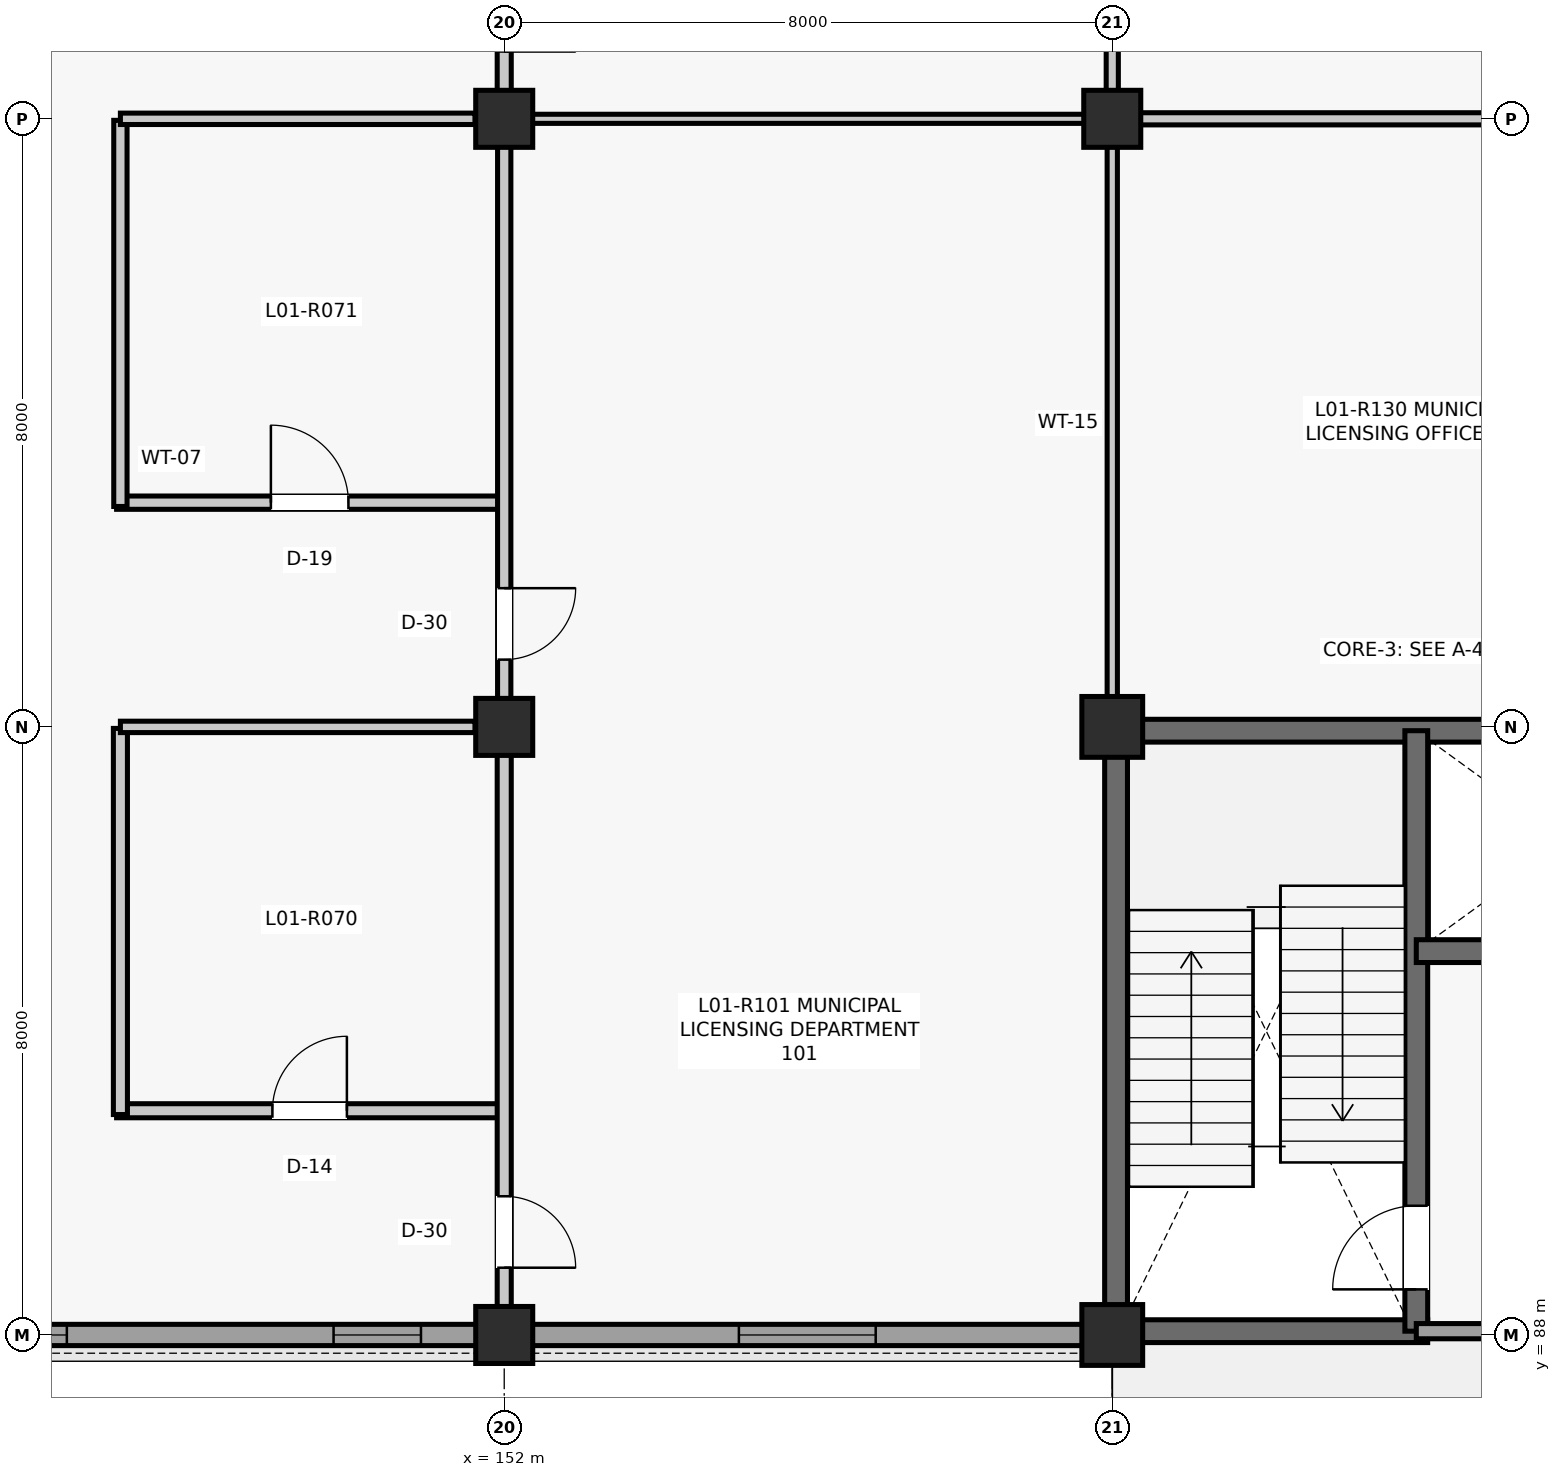
"""IFC4 building model, lengths in metres.
Left out: names, types, materials, properties, quantities, classifications, styles, units other than length and angle.
Written with IfcOpenShell. Run it as: python <this file> out.ifc"""

import sys

from ifc_helpers import new_model, si_unit, direction, frame, frame_2d, origin, origin_2d, place, context, subcontext, project, spatial, rectangle, extrude, element, fill, save


model = new_model("IFC4")
c1 = context("Model", 3, precision=1e-05, world=origin(), true_north=direction((0.0, 1.0)))
c2 = subcontext(c1, "Body", "Model", "MODEL_VIEW")
j1 = project(units=[si_unit("LENGTHUNIT", "METRE"), si_unit("PLANEANGLEUNIT", "RADIAN")], contexts=[c1])
p1 = place(None, origin())
s1 = spatial("IfcSite", under=j1, at=p1, CompositionType="ELEMENT")
p2 = place(p1, origin())
s2 = spatial("IfcBuilding", under=s1, at=p2, CompositionType="ELEMENT")
p3 = place(p2, frame((0.0, 0.0, 5.28)))
s3 = spatial("IfcBuildingStorey", under=s2, at=p3, CompositionType="ELEMENT", Elevation=5.28)
for number, where, z_axis, x_axis in (
    (1, (152.0, 88.0, 0.0), (0.0, 0.0, 1.0), (1.0, 0.0, 0.0)),
    (2, (152.0, 96.0, 0.0), (0.0, 0.0, 1.0), (1.0, 0.0, 0.0)),
    (3, (152.0, 104.0, 0.0), (0.0, 0.0, 1.0), (1.0, 0.0, 0.0)),
):
    element("IfcColumn", number, at=place(p3, frame(where, z_axis=z_axis, x_axis=x_axis)), inside=s3, PredefinedType="COLUMN", context=c2, shape_type="SweptSolid", body=[
        extrude(rectangle(XDim=0.75, YDim=0.75, at=origin_2d()), origin(), (0.0, 0.0, 1.0), 4.62),
    ])
for number, where, z_axis, x_axis in (
    (4, (160.0, 88.0, 0.0), (0.0, 0.0, 1.0), (1.0, 0.0, 0.0)),
    (5, (160.0, 96.0, 0.0), (0.0, 0.0, 1.0), (1.0, 0.0, 0.0)),
):
    element("IfcColumn", number, at=place(p3, frame(where, z_axis=z_axis, x_axis=x_axis)), inside=s3, PredefinedType="COLUMN", context=c2, shape_type="SweptSolid", body=[
        extrude(rectangle(XDim=0.8, YDim=0.8, at=origin_2d()), origin(), (0.0, 0.0, 1.0), 4.62),
    ])
p4 = place(p3, frame((160.0, 104.0, 0.0), z_axis=(0.0, 0.0, 1.0), x_axis=(1.0, 0.0, 0.0)))
e6 = element("IfcColumn", 6, at=p4, inside=s3, PredefinedType="COLUMN", context=c2, shape_type="SweptSolid", body=[
    extrude(rectangle(XDim=0.75, YDim=0.75, at=origin_2d()), origin(), (0.0, 0.0, 1.0), 4.62),
])
p5 = place(p3, frame((144.36, 88.0, 0.0), z_axis=(0.0, 0.0, 1.0), x_axis=(1.0, 0.0, 0.0)))
e7 = element("IfcWall", 7, at=p5, inside=s3, PredefinedType="SOLIDWALL", context=c2, shape_type="SweptSolid", body=[
    extrude(rectangle(XDim=7.28, YDim=0.28, at=frame_2d((3.64, 0.0))), origin(), (0.0, 0.0, 1.0), 3.914),
])
p6 = place(p5, frame((0.735, 0.0, 0.95)))
e8 = element("IfcOpeningElement", 8, at=p6, cuts=e7, PredefinedType="OPENING", context=c2, shape_type="SweptSolid", body=[
    extrude(rectangle(XDim=1.15, YDim=1.65, at=frame_2d((0.575, 0.825))), frame((0.0, 0.15, 0.0), z_axis=(0.0, -1.0, 0.0), x_axis=(1.0, 0.0, 0.0)), (0.0, 0.0, 1.0), 0.3),
])
p7 = place(p5, frame((5.395, 0.0, 0.95)))
e9 = element("IfcOpeningElement", 9, at=p7, cuts=e7, PredefinedType="OPENING", context=c2, shape_type="SweptSolid", body=[
    extrude(rectangle(XDim=1.15, YDim=1.65, at=frame_2d((0.575, 0.825))), frame((0.0, 0.15, 0.0), z_axis=(0.0, -1.0, 0.0), x_axis=(1.0, 0.0, 0.0)), (0.0, 0.0, 1.0), 0.3),
])
p8 = place(p3, frame((152.36, 88.0, 0.0), z_axis=(0.0, 0.0, 1.0), x_axis=(1.0, 0.0, 0.0)))
e10 = element("IfcWall", 10, at=p8, inside=s3, PredefinedType="SOLIDWALL", context=c2, shape_type="SweptSolid", body=[
    extrude(rectangle(XDim=7.255, YDim=0.28, at=frame_2d((3.627, 0.0))), origin(), (0.0, 0.0, 1.0), 3.977),
])
p9 = place(p8, frame((2.728, 0.0, 0.9)))
e11 = element("IfcOpeningElement", 11, at=p9, cuts=e10, PredefinedType="OPENING", context=c2, shape_type="SweptSolid", body=[
    extrude(rectangle(XDim=1.8, YDim=2.3, at=frame_2d((0.9, 1.15))), frame((0.0, 0.15, 0.0), z_axis=(0.0, -1.0, 0.0), x_axis=(1.0, 0.0, 0.0)), (0.0, 0.0, 1.0), 0.3),
])
for number, where, z_axis, x_axis in (
    (12, (160.05, 88.29, 0.0), (0.0, 0.0, 1.0), (0.0, 1.0, 0.0)),
    (13, (160.29, 95.95, 0.0), (0.0, 0.0, 1.0), (1.0, 0.0, 0.0)),
):
    element("IfcWall", number, at=place(p3, frame(where, z_axis=z_axis, x_axis=x_axis)), inside=s3, PredefinedType="SHEAR", context=c2, shape_type="SweptSolid", body=[
        extrude(rectangle(XDim=7.42, YDim=0.3, at=frame_2d((3.71, 0.0))), origin(), (0.0, 0.0, 1.0), 4.335),
    ])
p10 = place(p3, frame((160.29, 88.05, 0.0), z_axis=(0.0, 0.0, 1.0), x_axis=(1.0, 0.0, 0.0)))
e14 = element("IfcWall", 14, at=p10, inside=s3, PredefinedType="SHEAR", context=c2, shape_type="SweptSolid", body=[
    extrude(rectangle(XDim=3.86, YDim=0.3, at=frame_2d((1.93, 0.0))), origin(), (0.0, 0.0, 1.0), 4.335),
])
p11 = place(p3, frame((164.0, 88.05, 0.0), z_axis=(0.0, 0.0, 1.0), x_axis=(0.0, 1.0, 0.0)))
e15 = element("IfcWall", 15, at=p11, inside=s3, PredefinedType="SHEAR", context=c2, shape_type="SweptSolid", body=[
    extrude(rectangle(XDim=7.9, YDim=0.3, at=frame_2d((3.95, 0.0))), origin(), (0.0, 0.0, 1.0), 4.335),
])
p12 = place(p11, frame((0.55, 0.0, 0.0)))
e16 = element("IfcOpeningElement", 16, at=p12, cuts=e15, PredefinedType="OPENING", context=c2, shape_type="SweptSolid", body=[
    extrude(rectangle(XDim=1.1, YDim=2.15, at=frame_2d((0.55, 1.075))), frame((0.0, 0.16, 0.0), z_axis=(0.0, -1.0, 0.0), x_axis=(1.0, 0.0, 0.0)), (0.0, 0.0, 1.0), 0.32),
])
p13 = place(p3, frame((164.0, 93.05, 0.0), z_axis=(0.0, 0.0, 1.0), x_axis=(1.0, 0.0, 0.0)))
e17 = element("IfcWall", 17, at=p13, inside=s3, PredefinedType="SHEAR", context=c2, shape_type="SweptSolid", body=[
    extrude(rectangle(XDim=3.95, YDim=0.3, at=frame_2d((1.975, 0.0))), origin(), (0.0, 0.0, 1.0), 4.335),
])
p14 = place(p13, frame((1.375, 0.0, 0.0)))
e18 = element("IfcOpeningElement", 18, at=p14, cuts=e17, PredefinedType="OPENING", context=c2, shape_type="SweptSolid", body=[
    extrude(rectangle(XDim=1.2, YDim=2.2, at=frame_2d((0.6, 1.1))), frame((0.0, 0.16, 0.0), z_axis=(0.0, -1.0, 0.0), x_axis=(1.0, 0.0, 0.0)), (0.0, 0.0, 1.0), 0.32),
])
p15 = place(p3, frame((164.0, 88.05, 0.0), z_axis=(0.0, 0.0, 1.0), x_axis=(1.0, 0.0, 0.0)))
e19 = element("IfcWall", 19, at=p15, inside=s3, PredefinedType="PARTITIONING", context=c2, shape_type="SweptSolid", body=[
    extrude(rectangle(XDim=3.61, YDim=0.2, at=frame_2d((1.805, 0.0))), origin(), (0.0, 0.0, 1.0), 3.903),
])
p16 = place(p3, frame((146.9, 90.95, 0.0), z_axis=(0.0, 0.0, 1.0), x_axis=(1.0, 0.0, 0.0)))
e20 = element("IfcWall", 20, at=p16, inside=s3, PredefinedType="PARTITIONING", context=c2, shape_type="SweptSolid", body=[
    extrude(rectangle(XDim=5.08, YDim=0.185, at=frame_2d((2.54, 0.0))), origin(), (0.0, 0.0, 1.0), 3.781),
])
p17 = place(p16, frame((2.05, 0.0, 0.0)))
e21 = element("IfcOpeningElement", 21, at=p17, cuts=e20, PredefinedType="OPENING", context=c2, shape_type="SweptSolid", body=[
    extrude(rectangle(XDim=0.98, YDim=2.15, at=frame_2d((0.49, 1.075))), frame((0.0, 0.103, 0.0), z_axis=(0.0, -1.0, 0.0), x_axis=(1.0, 0.0, 0.0)), (0.0, 0.0, 1.0), 0.205),
])
p18 = place(p3, frame((146.95, 90.9, 0.0), z_axis=(0.0, 0.0, 1.0), x_axis=(0.0, 1.0, 0.0)))
e22 = element("IfcWall", 22, at=p18, inside=s3, PredefinedType="PARTITIONING", context=c2, shape_type="SweptSolid", body=[
    extrude(rectangle(XDim=5.08, YDim=0.185, at=frame_2d((2.54, 0.0))), origin(), (0.0, 0.0, 1.0), 3.771),
])
p19 = place(p3, frame((146.95, 96.0, 0.0), z_axis=(0.0, 0.0, 1.0), x_axis=(1.0, 0.0, 0.0)))
e23 = element("IfcWall", 23, at=p19, inside=s3, PredefinedType="PARTITIONING", context=c2, shape_type="SweptSolid", body=[
    extrude(rectangle(XDim=4.665, YDim=0.15, at=frame_2d((2.333, 0.0))), origin(), (0.0, 0.0, 1.0), 3.771),
])
p20 = place(p3, frame((146.9, 98.95, 0.0), z_axis=(0.0, 0.0, 1.0), x_axis=(1.0, 0.0, 0.0)))
e24 = element("IfcWall", 24, at=p20, inside=s3, PredefinedType="PARTITIONING", context=c2, shape_type="SweptSolid", body=[
    extrude(rectangle(XDim=5.08, YDim=0.175, at=frame_2d((2.54, 0.0))), origin(), (0.0, 0.0, 1.0), 3.851),
])
p21 = place(p20, frame((2.03, 0.0, 0.0)))
e25 = element("IfcOpeningElement", 25, at=p21, cuts=e24, PredefinedType="OPENING", context=c2, shape_type="SweptSolid", body=[
    extrude(rectangle(XDim=1.02, YDim=2.2, at=frame_2d((0.51, 1.1))), frame((0.0, 0.097, 0.0), z_axis=(0.0, -1.0, 0.0), x_axis=(1.0, 0.0, 0.0)), (0.0, 0.0, 1.0), 0.195),
])
p22 = place(p3, frame((146.95, 98.9, 0.0), z_axis=(0.0, 0.0, 1.0), x_axis=(0.0, 1.0, 0.0)))
e26 = element("IfcWall", 26, at=p22, inside=s3, PredefinedType="PARTITIONING", context=c2, shape_type="SweptSolid", body=[
    extrude(rectangle(XDim=5.08, YDim=0.175, at=frame_2d((2.54, 0.0))), origin(), (0.0, 0.0, 1.0), 3.781),
])
p23 = place(p3, frame((146.95, 104.0, 0.0), z_axis=(0.0, 0.0, 1.0), x_axis=(1.0, 0.0, 0.0)))
e27 = element("IfcWall", 27, at=p23, inside=s3, PredefinedType="PARTITIONING", context=c2, shape_type="SweptSolid", body=[
    extrude(rectangle(XDim=4.665, YDim=0.15, at=frame_2d((2.333, 0.0))), origin(), (0.0, 0.0, 1.0), 3.781),
])
p24 = place(p3, frame((152.0, 88.365, 0.0), z_axis=(0.0, 0.0, 1.0), x_axis=(0.0, 1.0, 0.0)))
e28 = element("IfcWall", 28, at=p24, inside=s3, PredefinedType="PARTITIONING", context=c2, shape_type="SweptSolid", body=[
    extrude(rectangle(XDim=7.27, YDim=0.185, at=frame_2d((3.635, 0.0))), origin(), (0.0, 0.0, 1.0), 3.781),
])
p25 = place(p24, frame((0.52, 0.0, 0.0)))
e29 = element("IfcOpeningElement", 29, at=p25, cuts=e28, PredefinedType="OPENING", context=c2, shape_type="SweptSolid", body=[
    extrude(rectangle(XDim=0.94, YDim=2.12, at=frame_2d((0.47, 1.06))), frame((0.0, 0.103, 0.0), z_axis=(0.0, -1.0, 0.0), x_axis=(1.0, 0.0, 0.0)), (0.0, 0.0, 1.0), 0.205),
])
p26 = place(p3, frame((152.0, 96.365, 0.0), z_axis=(0.0, 0.0, 1.0), x_axis=(0.0, 1.0, 0.0)))
e30 = element("IfcWall", 30, at=p26, inside=s3, PredefinedType="PARTITIONING", context=c2, shape_type="SweptSolid", body=[
    extrude(rectangle(XDim=7.27, YDim=0.175, at=frame_2d((3.635, 0.0))), origin(), (0.0, 0.0, 1.0), 3.851),
])
p27 = place(p26, frame((0.52, 0.0, 0.0)))
e31 = element("IfcOpeningElement", 31, at=p27, cuts=e30, PredefinedType="OPENING", context=c2, shape_type="SweptSolid", body=[
    extrude(rectangle(XDim=0.94, YDim=2.12, at=frame_2d((0.47, 1.06))), frame((0.0, 0.097, 0.0), z_axis=(0.0, -1.0, 0.0), x_axis=(1.0, 0.0, 0.0)), (0.0, 0.0, 1.0), 0.195),
])
p28 = place(p3, frame((152.0, 104.365, 0.0), z_axis=(0.0, 0.0, 1.0), x_axis=(0.0, 1.0, 0.0)))
e32 = element("IfcWall", 32, at=p28, inside=s3, PredefinedType="PARTITIONING", context=c2, shape_type="SweptSolid", body=[
    extrude(rectangle(XDim=7.27, YDim=0.185, at=frame_2d((3.635, 0.0))), origin(), (0.0, 0.0, 1.0), 3.787),
])
p29 = place(p28, frame((0.52, 0.0, 0.0)))
e33 = element("IfcOpeningElement", 33, at=p29, cuts=e32, PredefinedType="OPENING", context=c2, shape_type="SweptSolid", body=[
    extrude(rectangle(XDim=0.94, YDim=2.12, at=frame_2d((0.47, 1.06))), frame((0.0, 0.103, 0.0), z_axis=(0.0, -1.0, 0.0), x_axis=(1.0, 0.0, 0.0)), (0.0, 0.0, 1.0), 0.205),
])
p30 = place(p3, frame((160.0, 96.39, 0.0), z_axis=(0.0, 0.0, 1.0), x_axis=(0.0, 1.0, 0.0)))
e34 = element("IfcWall", 34, at=p30, inside=s3, PredefinedType="PARTITIONING", context=c2, shape_type="SweptSolid", body=[
    extrude(rectangle(XDim=7.245, YDim=0.135, at=frame_2d((3.623, 0.0))), origin(), (0.0, 0.0, 1.0), 3.787),
])
p31 = place(p3, frame((152.365, 104.0, 0.0), z_axis=(0.0, 0.0, 1.0), x_axis=(1.0, 0.0, 0.0)))
e35 = element("IfcWall", 35, at=p31, inside=s3, PredefinedType="PARTITIONING", context=c2, shape_type="SweptSolid", body=[
    extrude(rectangle(XDim=7.27, YDim=0.12, at=frame_2d((3.635, 0.0))), origin(), (0.0, 0.0, 1.0), 3.712),
])
p32 = place(p3, frame((160.0, 104.365, 0.0), z_axis=(0.0, 0.0, 1.0), x_axis=(0.0, 1.0, 0.0)))
e36 = element("IfcWall", 36, at=p32, inside=s3, PredefinedType="PARTITIONING", context=c2, shape_type="SweptSolid", body=[
    extrude(rectangle(XDim=7.27, YDim=0.16, at=frame_2d((3.635, 0.0))), origin(), (0.0, 0.0, 1.0), 3.857),
])
p33 = place(p3, frame((160.365, 104.0, 0.0), z_axis=(0.0, 0.0, 1.0), x_axis=(1.0, 0.0, 0.0)))
e37 = element("IfcWall", 37, at=p33, inside=s3, PredefinedType="PARTITIONING", context=c2, shape_type="SweptSolid", body=[
    extrude(rectangle(XDim=7.27, YDim=0.16, at=frame_2d((3.635, 0.0))), origin(), (0.0, 0.0, 1.0), 3.787),
])
p34 = place(p6, origin())
e38 = element("IfcWindow", 38, at=p34, inside=s3, PartitioningType="SINGLE_PANEL", PredefinedType="WINDOW", context=c2, shape_type="SweptSolid", body=[
    extrude(rectangle(XDim=1.15, YDim=1.65, at=frame_2d((0.575, 0.825))), frame((0.0, 0.03, 0.0), z_axis=(0.0, -1.0, 0.0), x_axis=(1.0, 0.0, 0.0)), (0.0, 0.0, 1.0), 0.06),
])
fill(e8, e38)
p35 = place(p7, origin())
e39 = element("IfcWindow", 39, at=p35, inside=s3, PartitioningType="SINGLE_PANEL", PredefinedType="WINDOW", context=c2, shape_type="SweptSolid", body=[
    extrude(rectangle(XDim=1.15, YDim=1.65, at=frame_2d((0.575, 0.825))), frame((0.0, 0.03, 0.0), z_axis=(0.0, -1.0, 0.0), x_axis=(1.0, 0.0, 0.0)), (0.0, 0.0, 1.0), 0.06),
])
fill(e9, e39)
p36 = place(p9, origin())
e40 = element("IfcWindow", 40, at=p36, inside=s3, PartitioningType="SINGLE_PANEL", PredefinedType="WINDOW", context=c2, shape_type="SweptSolid", body=[
    extrude(rectangle(XDim=1.8, YDim=2.3, at=frame_2d((0.9, 1.15))), frame((0.0, 0.03, 0.0), z_axis=(0.0, -1.0, 0.0), x_axis=(1.0, 0.0, 0.0)), (0.0, 0.0, 1.0), 0.06),
])
fill(e11, e40)
p37 = place(p12, origin())
e41 = element("IfcDoor", 41, at=p37, inside=s3, OperationType="SINGLE_SWING_LEFT", PredefinedType="DOOR", context=c2, shape_type="SweptSolid", body=[
    extrude(rectangle(XDim=1.1, YDim=2.15, at=frame_2d((0.55, 1.075))), frame((0.0, 0.025, 0.0), z_axis=(0.0, -1.0, 0.0), x_axis=(1.0, 0.0, 0.0)), (0.0, 0.0, 1.0), 0.05),
])
fill(e16, e41)
p38 = place(p17, origin())
e42 = element("IfcDoor", 42, at=p38, inside=s3, OperationType="SINGLE_SWING_RIGHT", PredefinedType="DOOR", context=c2, shape_type="SweptSolid", body=[
    extrude(rectangle(XDim=0.98, YDim=2.15, at=frame_2d((0.49, 1.075))), frame((0.0, 0.025, 0.0), z_axis=(0.0, -1.0, 0.0), x_axis=(1.0, 0.0, 0.0)), (0.0, 0.0, 1.0), 0.05),
])
fill(e21, e42)
p39 = place(p21, origin())
e43 = element("IfcDoor", 43, at=p39, inside=s3, OperationType="SINGLE_SWING_LEFT", PredefinedType="DOOR", context=c2, shape_type="SweptSolid", body=[
    extrude(rectangle(XDim=1.02, YDim=2.2, at=frame_2d((0.51, 1.1))), frame((0.0, 0.025, 0.0), z_axis=(0.0, -1.0, 0.0), x_axis=(1.0, 0.0, 0.0)), (0.0, 0.0, 1.0), 0.05),
])
fill(e25, e43)
p40 = place(p25, frame((0.94, 0.0, 0.0), z_axis=(0.0, 0.0, 1.0), x_axis=(-1.0, 0.0, 0.0)))
e44 = element("IfcDoor", 44, at=p40, inside=s3, OperationType="SINGLE_SWING_LEFT", PredefinedType="DOOR", context=c2, shape_type="SweptSolid", body=[
    extrude(rectangle(XDim=0.94, YDim=2.12, at=frame_2d((0.47, 1.06))), frame((0.0, 0.025, 0.0), z_axis=(0.0, -1.0, 0.0), x_axis=(1.0, 0.0, 0.0)), (0.0, 0.0, 1.0), 0.05),
])
fill(e29, e44)
p41 = place(p27, frame((0.94, 0.0, 0.0), z_axis=(0.0, 0.0, 1.0), x_axis=(-1.0, 0.0, 0.0)))
e45 = element("IfcDoor", 45, at=p41, inside=s3, OperationType="SINGLE_SWING_RIGHT", PredefinedType="DOOR", context=c2, shape_type="SweptSolid", body=[
    extrude(rectangle(XDim=0.94, YDim=2.12, at=frame_2d((0.47, 1.06))), frame((0.0, 0.025, 0.0), z_axis=(0.0, -1.0, 0.0), x_axis=(1.0, 0.0, 0.0)), (0.0, 0.0, 1.0), 0.05),
])
fill(e31, e45)
save(model, sys.argv[1])
